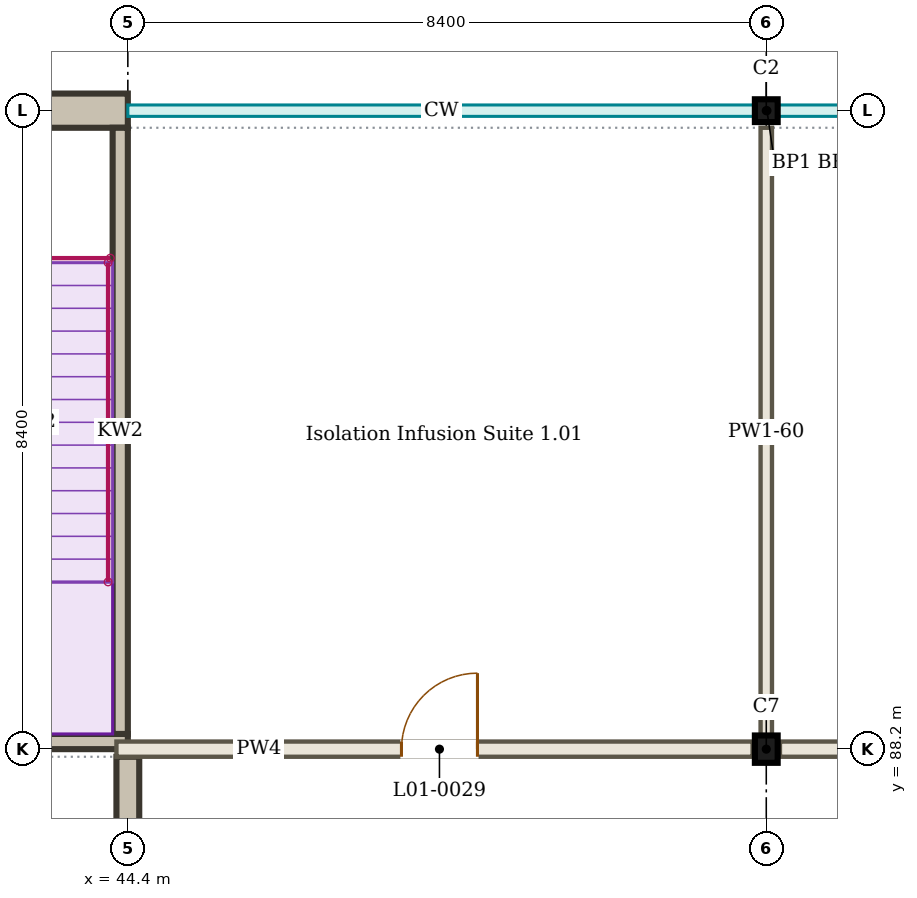
"""IFC4 building model, lengths in metres.
Left out: names, types, materials, properties, quantities, classifications, styles, units other than length and angle.
Written with IfcOpenShell. Run it as: python <this file> out.ifc"""

import sys

from ifc_helpers import new_model, si_unit, direction, frame, frame_2d, origin, origin_2d, place, context, subcontext, project, spatial, rectangle, i_section, extrude, element, fill, save


model = new_model("IFC4")
c1 = context("Model", 3, precision=1e-05, world=origin(), true_north=direction((0.0, 1.0)))
c2 = subcontext(c1, "Body", "Model", "MODEL_VIEW")
j1 = project(units=[si_unit("LENGTHUNIT", "METRE"), si_unit("PLANEANGLEUNIT", "RADIAN")], contexts=[c1])
p1 = place(None, origin())
s1 = spatial("IfcSite", under=j1, at=p1, CompositionType="ELEMENT")
p2 = place(p1, origin())
s2 = spatial("IfcBuilding", under=s1, at=p2, CompositionType="ELEMENT")
p3 = place(p2, frame((0.0, 0.0, 4.5)))
s3 = spatial("IfcBuildingStorey", under=s2, at=p3, CompositionType="ELEMENT", Elevation=4.5)
p4 = place(p3, frame((52.8, 88.2, 0.0), z_axis=(0.0, 0.0, 1.0), x_axis=(1.0, 0.0, 0.0)))
e1 = element("IfcColumn", 1, at=p4, inside=s3, PredefinedType="COLUMN", context=c2, shape_type="SweptSolid", body=[
    extrude(i_section(OverallWidth=0.3, OverallDepth=0.36, WebThickness=0.012, FlangeThickness=0.022, FilletRadius=0.027, at=origin_2d()), origin(), (0.0, 0.0, 1.0), 4.5),
])
p5 = place(p3, frame((52.8, 96.6, 0.0), z_axis=(0.0, 0.0, 1.0), x_axis=(1.0, 0.0, 0.0)))
e2 = element("IfcColumn", 2, at=p5, inside=s3, PredefinedType="COLUMN", context=c2, shape_type="SweptSolid", body=[
    extrude(i_section(OverallWidth=0.3, OverallDepth=0.3, WebThickness=0.011, FlangeThickness=0.019, FilletRadius=0.027, at=origin_2d()), origin(), (0.0, 0.0, 1.0), 4.5),
])
p6 = place(p3, frame((44.4, 96.76, 3.87), z_axis=(0.0, 0.0, 1.0), x_axis=(1.0, 0.0, 0.0)))
e3 = element("IfcWall", 3, at=p6, inside=s3, PredefinedType="SOLIDWALL", context=c2, shape_type="SweptSolid", body=[
    extrude(rectangle(XDim=8.4, YDim=0.13, at=frame_2d((4.2, 0.0))), origin(), (0.0, 0.0, 1.0), 0.63),
])
p7 = place(p3, frame((44.25, 88.2, 0.0), z_axis=(0.0, 0.0, 1.0), x_axis=(1.0, 0.0, 0.0)))
e4 = element("IfcWall", 4, at=p7, inside=s3, PredefinedType="PARTITIONING", context=c2, shape_type="SweptSolid", body=[
    extrude(rectangle(XDim=8.37, YDim=0.2, at=frame_2d((4.185, 0.0))), origin(), (0.0, 0.0, 1.0), 3.8),
])
p8 = place(p7, frame((3.75, 0.0, 0.0)))
e5 = element("IfcOpeningElement", 5, at=p8, cuts=e4, PredefinedType="OPENING", context=c2, shape_type="SweptSolid", body=[
    extrude(rectangle(XDim=1.0, YDim=2.1, at=frame_2d((0.5, 1.05))), frame((0.0, 0.11, 0.0), z_axis=(0.0, -1.0, 0.0), x_axis=(1.0, 0.0, 0.0)), (0.0, 0.0, 1.0), 0.22),
])
p9 = place(p3, frame((52.98, 88.2, 0.0), z_axis=(0.0, 0.0, 1.0), x_axis=(1.0, 0.0, 0.0)))
e6 = element("IfcWall", 6, at=p9, inside=s3, PredefinedType="PARTITIONING", context=c2, shape_type="SweptSolid", body=[
    extrude(rectangle(XDim=8.04, YDim=0.2, at=frame_2d((4.02, 0.0))), origin(), (0.0, 0.0, 1.0), 3.8),
])
p10 = place(p9, frame((3.42, 0.0, 0.0)))
e7 = element("IfcOpeningElement", 7, at=p10, cuts=e6, PredefinedType="OPENING", context=c2, shape_type="SweptSolid", body=[
    extrude(rectangle(XDim=1.0, YDim=2.1, at=frame_2d((0.5, 1.05))), frame((0.0, 0.11, 0.0), z_axis=(0.0, -1.0, 0.0), x_axis=(1.0, 0.0, 0.0)), (0.0, 0.0, 1.0), 0.22),
])
p11 = place(p3, frame((44.4, 85.5, 0.0), z_axis=(0.0, 0.0, 1.0), x_axis=(0.0, 1.0, 0.0)))
e8 = element("IfcWall", 8, at=p11, inside=s3, PredefinedType="SOLIDWALL", context=c2, shape_type="SweptSolid", body=[
    extrude(rectangle(XDim=2.6, YDim=0.3, at=frame_2d((1.3, 0.0))), origin(), (0.0, 0.0, 1.0), 3.8),
])
p12 = place(p3, frame((52.8, 88.38, 0.0), z_axis=(0.0, 0.0, 1.0), x_axis=(0.0, 1.0, 0.0)))
e9 = element("IfcWall", 9, at=p12, inside=s3, PredefinedType="PARTITIONING", context=c2, shape_type="SweptSolid", body=[
    extrude(rectangle(XDim=7.995, YDim=0.15, at=frame_2d((3.998, 0.0))), origin(), (0.0, 0.0, 1.0), 3.8),
])
p13 = place(p3, frame((44.4, 88.3, 0.0), z_axis=(0.0, 0.0, 1.0), x_axis=(-1.0, 0.0, 0.0)))
e10 = element("IfcWall", 10, at=p13, inside=s3, PredefinedType="SOLIDWALL", context=c2, shape_type="SweptSolid", body=[
    extrude(rectangle(XDim=8.4, YDim=0.2, at=frame_2d((4.2, 0.0))), origin(), (0.0, 0.0, 1.0), 4.5),
])
p14 = place(p13, frame((4.725, 0.0, 0.0)))
e11 = element("IfcOpeningElement", 11, at=p14, cuts=e10, PredefinedType="OPENING", context=c2, shape_type="SweptSolid", body=[
    extrude(rectangle(XDim=1.3, YDim=2.1, at=frame_2d((0.65, 1.05))), frame((0.0, 0.11, 0.0), z_axis=(0.0, -1.0, 0.0), x_axis=(1.0, 0.0, 0.0)), (0.0, 0.0, 1.0), 0.22),
])
p15 = place(p3, frame((44.4, 96.6, 0.0), z_axis=(0.0, 0.0, 1.0), x_axis=(-1.0, 0.0, 0.0)))
e12 = element("IfcWall", 12, at=p15, inside=s3, PredefinedType="SOLIDWALL", context=c2, shape_type="SweptSolid", body=[
    extrude(rectangle(XDim=8.4, YDim=0.45, at=frame_2d((4.2, 0.0))), origin(), (0.0, 0.0, 1.0), 4.5),
])
p16 = place(p3, frame((44.3, 88.4, 0.0), z_axis=(0.0, 0.0, 1.0), x_axis=(0.0, 1.0, 0.0)))
e13 = element("IfcWall", 13, at=p16, inside=s3, PredefinedType="SOLIDWALL", context=c2, shape_type="SweptSolid", body=[
    extrude(rectangle(XDim=7.975, YDim=0.2, at=frame_2d((3.988, 0.0))), origin(), (0.0, 0.0, 1.0), 4.5),
])
p17 = place(p8, origin())
e14 = element("IfcDoor", 14, at=p17, inside=s3, OperationType="SINGLE_SWING_RIGHT", PredefinedType="DOOR", context=c2, shape_type="SweptSolid", body=[
    extrude(rectangle(XDim=1.0, YDim=2.1, at=frame_2d((0.5, 1.05))), frame((0.0, 0.025, 0.0), z_axis=(0.0, -1.0, 0.0), x_axis=(1.0, 0.0, 0.0)), (0.0, 0.0, 1.0), 0.05),
])
fill(e5, e14)
save(model, sys.argv[1])
